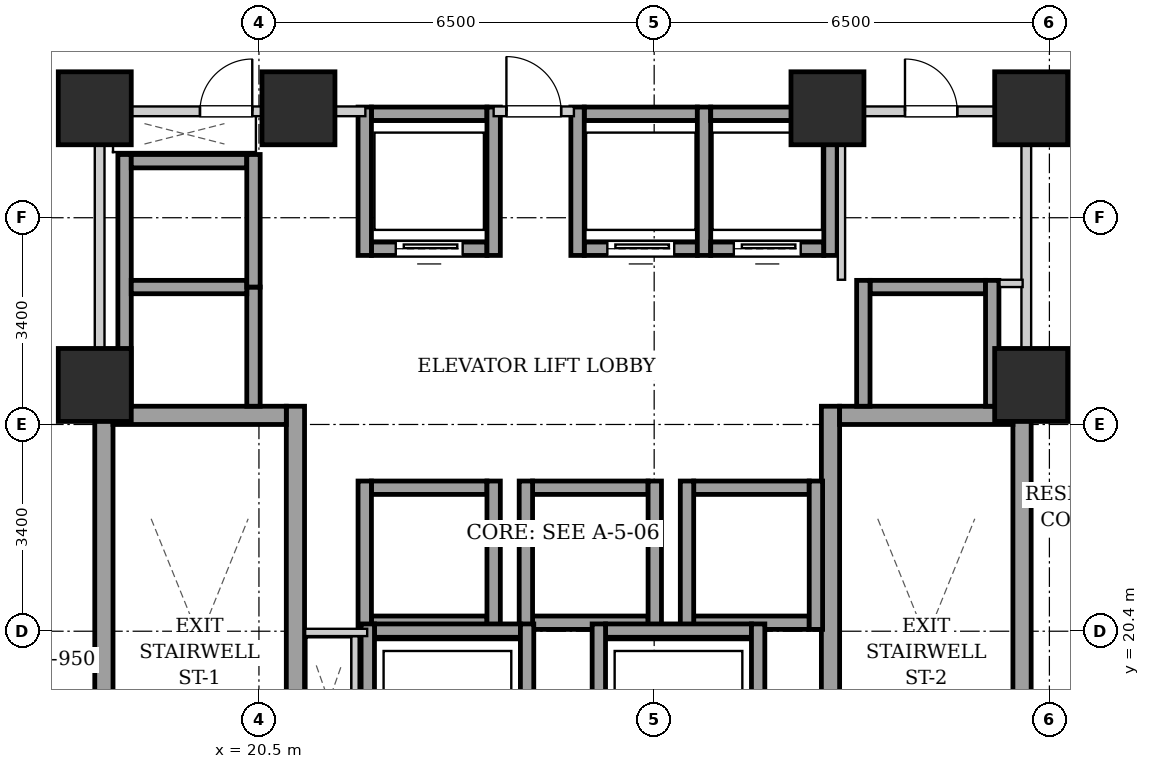
"""IFC4 building model, lengths in metres.
Left out: names, types, materials, properties, quantities, classifications, styles, units other than length and angle.
Written with IfcOpenShell. Run it as: python <this file> out.ifc"""

import sys

from ifc_helpers import new_model, si_unit, direction, frame, frame_2d, origin, origin_2d, place, context, subcontext, project, spatial, rectangle, extrude, element, fill, save


model = new_model("IFC4")
c1 = context("Model", 3, precision=1e-05, world=origin(), true_north=direction((0.0, 1.0)))
c2 = subcontext(c1, "Body", "Model", "MODEL_VIEW")
j1 = project(units=[si_unit("LENGTHUNIT", "METRE"), si_unit("PLANEANGLEUNIT", "RADIAN")], contexts=[c1])
p1 = place(None, origin())
s1 = spatial("IfcSite", under=j1, at=p1, CompositionType="ELEMENT")
p2 = place(p1, origin())
s2 = spatial("IfcBuilding", under=s1, at=p2, CompositionType="ELEMENT")
p3 = place(p2, frame((0.0, 0.0, 29.0)))
s3 = spatial("IfcBuildingStorey", under=s2, at=p3, CompositionType="ELEMENT", Elevation=29.0)
for number, where, z_axis, x_axis in (
    (1, (17.8, 29.0, 0.0), (0.0, 0.0, 1.0), (1.0, 0.0, 0.0)),
    (2, (21.15, 29.0, 0.0), (0.0, 0.0, 1.0), (1.0, 0.0, 0.0)),
    (3, (29.85, 29.0, 0.0), (0.0, 0.0, 1.0), (1.0, 0.0, 0.0)),
    (4, (33.2, 29.0, 0.0), (0.0, 0.0, 1.0), (1.0, 0.0, 0.0)),
    (5, (17.8, 24.45, 0.0), (0.0, 0.0, 1.0), (1.0, 0.0, 0.0)),
    (6, (33.2, 24.45, 0.0), (0.0, 0.0, 1.0), (1.0, 0.0, 0.0)),
):
    element("IfcColumn", number, at=place(p3, frame(where, z_axis=z_axis, x_axis=x_axis)), inside=s3, PredefinedType="COLUMN", context=c2, shape_type="SweptSolid", body=[
        extrude(rectangle(XDim=1.2, YDim=1.2, at=origin_2d()), origin(), (0.0, 0.0, 1.0), 3.2),
    ])
for number, where, z_axis, x_axis in (
    (7, (17.95, 15.1, 0.0), (0.0, 0.0, 1.0), (0.0, 1.0, 0.0)),
    (8, (21.1, 15.1, 0.0), (0.0, 0.0, 1.0), (0.0, 1.0, 0.0)),
):
    element("IfcWall", number, at=place(p3, frame(where, z_axis=z_axis, x_axis=x_axis)), inside=s3, PredefinedType="SHEAR", context=c2, shape_type="SweptSolid", body=[
        extrude(rectangle(XDim=9.0, YDim=0.3, at=frame_2d((4.5, 0.0))), origin(), (0.0, 0.0, 1.0), 2.94),
    ])
p4 = place(p3, frame((18.1, 23.95, 0.0), z_axis=(0.0, 0.0, 1.0), x_axis=(1.0, 0.0, 0.0)))
e9 = element("IfcWall", 9, at=p4, inside=s3, PredefinedType="SHEAR", context=c2, shape_type="SweptSolid", body=[
    extrude(rectangle(XDim=2.85, YDim=0.3, at=frame_2d((1.425, 0.0))), origin(), (0.0, 0.0, 1.0), 2.94),
])
for number, where, z_axis, x_axis in (
    (10, (29.9, 15.1, 0.0), (0.0, 0.0, 1.0), (0.0, 1.0, 0.0)),
    (11, (33.05, 15.1, 0.0), (0.0, 0.0, 1.0), (0.0, 1.0, 0.0)),
):
    element("IfcWall", number, at=place(p3, frame(where, z_axis=z_axis, x_axis=x_axis)), inside=s3, PredefinedType="SHEAR", context=c2, shape_type="SweptSolid", body=[
        extrude(rectangle(XDim=9.0, YDim=0.3, at=frame_2d((4.5, 0.0))), origin(), (0.0, 0.0, 1.0), 2.94),
    ])
p5 = place(p3, frame((30.05, 23.95, 0.0), z_axis=(0.0, 0.0, 1.0), x_axis=(1.0, 0.0, 0.0)))
e12 = element("IfcWall", 12, at=p5, inside=s3, PredefinedType="SHEAR", context=c2, shape_type="SweptSolid", body=[
    extrude(rectangle(XDim=2.85, YDim=0.3, at=frame_2d((1.425, 0.0))), origin(), (0.0, 0.0, 1.0), 2.94),
])
p6 = place(p3, frame((22.35, 26.69, 0.0), z_axis=(0.0, 0.0, 1.0), x_axis=(1.0, 0.0, 0.0)))
e13 = element("IfcWall", 13, at=p6, inside=s3, PredefinedType="SHEAR", context=c2, shape_type="SweptSolid", body=[
    extrude(rectangle(XDim=1.9, YDim=0.22, at=frame_2d((0.95, 0.0))), origin(), (0.0, 0.0, 1.0), 2.94),
])
p7 = place(p6, frame((0.4, 0.0, 0.0)))
e14 = element("IfcOpeningElement", 14, at=p7, cuts=e13, PredefinedType="OPENING", context=c2, shape_type="SweptSolid", body=[
    extrude(rectangle(XDim=1.1, YDim=2.15, at=frame_2d((0.55, 1.075))), frame((0.0, 0.12, 0.0), z_axis=(0.0, -1.0, 0.0), x_axis=(1.0, 0.0, 0.0)), (0.0, 0.0, 1.0), 0.24),
])
p8 = place(p3, frame((22.35, 28.91, 0.0), z_axis=(0.0, 0.0, 1.0), x_axis=(1.0, 0.0, 0.0)))
e15 = element("IfcWall", 15, at=p8, inside=s3, PredefinedType="SHEAR", context=c2, shape_type="SweptSolid", body=[
    extrude(rectangle(XDim=1.9, YDim=0.22, at=frame_2d((0.95, 0.0))), origin(), (0.0, 0.0, 1.0), 2.94),
])
for number, where, z_axis, x_axis in (
    (16, (22.24, 26.58, 0.0), (0.0, 0.0, 1.0), (0.0, 1.0, 0.0)),
    (17, (24.36, 26.58, 0.0), (0.0, 0.0, 1.0), (0.0, 1.0, 0.0)),
):
    element("IfcWall", number, at=place(p3, frame(where, z_axis=z_axis, x_axis=x_axis)), inside=s3, PredefinedType="SHEAR", context=c2, shape_type="SweptSolid", body=[
        extrude(rectangle(XDim=2.44, YDim=0.22, at=frame_2d((1.22, 0.0))), origin(), (0.0, 0.0, 1.0), 2.94),
    ])
p9 = place(p3, frame((25.85, 26.69, 0.0), z_axis=(0.0, 0.0, 1.0), x_axis=(1.0, 0.0, 0.0)))
e18 = element("IfcWall", 18, at=p9, inside=s3, PredefinedType="SHEAR", context=c2, shape_type="SweptSolid", body=[
    extrude(rectangle(XDim=1.86, YDim=0.22, at=frame_2d((0.93, 0.0))), origin(), (0.0, 0.0, 1.0), 2.94),
])
p10 = place(p9, frame((0.38, 0.0, 0.0)))
e19 = element("IfcOpeningElement", 19, at=p10, cuts=e18, PredefinedType="OPENING", context=c2, shape_type="SweptSolid", body=[
    extrude(rectangle(XDim=1.1, YDim=2.15, at=frame_2d((0.55, 1.075))), frame((0.0, 0.12, 0.0), z_axis=(0.0, -1.0, 0.0), x_axis=(1.0, 0.0, 0.0)), (0.0, 0.0, 1.0), 0.24),
])
p11 = place(p3, frame((25.85, 28.91, 0.0), z_axis=(0.0, 0.0, 1.0), x_axis=(1.0, 0.0, 0.0)))
e20 = element("IfcWall", 20, at=p11, inside=s3, PredefinedType="SHEAR", context=c2, shape_type="SweptSolid", body=[
    extrude(rectangle(XDim=1.86, YDim=0.22, at=frame_2d((0.93, 0.0))), origin(), (0.0, 0.0, 1.0), 2.94),
])
for number, where, z_axis, x_axis in (
    (21, (25.74, 26.58, 0.0), (0.0, 0.0, 1.0), (0.0, 1.0, 0.0)),
    (22, (27.82, 26.58, 0.0), (0.0, 0.0, 1.0), (0.0, 1.0, 0.0)),
):
    element("IfcWall", number, at=place(p3, frame(where, z_axis=z_axis, x_axis=x_axis)), inside=s3, PredefinedType="SHEAR", context=c2, shape_type="SweptSolid", body=[
        extrude(rectangle(XDim=2.44, YDim=0.22, at=frame_2d((1.22, 0.0))), origin(), (0.0, 0.0, 1.0), 2.94),
    ])
p12 = place(p3, frame((27.93, 26.69, 0.0), z_axis=(0.0, 0.0, 1.0), x_axis=(1.0, 0.0, 0.0)))
e23 = element("IfcWall", 23, at=p12, inside=s3, PredefinedType="SHEAR", context=c2, shape_type="SweptSolid", body=[
    extrude(rectangle(XDim=1.86, YDim=0.22, at=frame_2d((0.93, 0.0))), origin(), (0.0, 0.0, 1.0), 2.94),
])
p13 = place(p12, frame((0.38, 0.0, 0.0)))
e24 = element("IfcOpeningElement", 24, at=p13, cuts=e23, PredefinedType="OPENING", context=c2, shape_type="SweptSolid", body=[
    extrude(rectangle(XDim=1.1, YDim=2.15, at=frame_2d((0.55, 1.075))), frame((0.0, 0.12, 0.0), z_axis=(0.0, -1.0, 0.0), x_axis=(1.0, 0.0, 0.0)), (0.0, 0.0, 1.0), 0.24),
])
p14 = place(p3, frame((27.93, 28.91, 0.0), z_axis=(0.0, 0.0, 1.0), x_axis=(1.0, 0.0, 0.0)))
e25 = element("IfcWall", 25, at=p14, inside=s3, PredefinedType="SHEAR", context=c2, shape_type="SweptSolid", body=[
    extrude(rectangle(XDim=1.86, YDim=0.22, at=frame_2d((0.93, 0.0))), origin(), (0.0, 0.0, 1.0), 2.94),
])
p15 = place(p3, frame((29.9, 26.58, 0.0), z_axis=(0.0, 0.0, 1.0), x_axis=(0.0, 1.0, 0.0)))
e26 = element("IfcWall", 26, at=p15, inside=s3, PredefinedType="SHEAR", context=c2, shape_type="SweptSolid", body=[
    extrude(rectangle(XDim=2.44, YDim=0.22, at=frame_2d((1.22, 0.0))), origin(), (0.0, 0.0, 1.0), 2.94),
])
for number, where, z_axis, x_axis in (
    (27, (22.35, 20.54, 0.0), (0.0, 0.0, 1.0), (1.0, 0.0, 0.0)),
    (28, (22.35, 22.76, 0.0), (0.0, 0.0, 1.0), (1.0, 0.0, 0.0)),
):
    element("IfcWall", number, at=place(p3, frame(where, z_axis=z_axis, x_axis=x_axis)), inside=s3, PredefinedType="SHEAR", context=c2, shape_type="SweptSolid", body=[
        extrude(rectangle(XDim=1.9, YDim=0.22, at=frame_2d((0.95, 0.0))), origin(), (0.0, 0.0, 1.0), 2.94),
    ])
for number, where, z_axis, x_axis in (
    (29, (22.24, 20.43, 0.0), (0.0, 0.0, 1.0), (0.0, 1.0, 0.0)),
    (30, (24.36, 20.43, 0.0), (0.0, 0.0, 1.0), (0.0, 1.0, 0.0)),
):
    element("IfcWall", number, at=place(p3, frame(where, z_axis=z_axis, x_axis=x_axis)), inside=s3, PredefinedType="SHEAR", context=c2, shape_type="SweptSolid", body=[
        extrude(rectangle(XDim=2.44, YDim=0.22, at=frame_2d((1.22, 0.0))), origin(), (0.0, 0.0, 1.0), 2.94),
    ])
for number, where, z_axis, x_axis in (
    (31, (25.0, 20.54, 0.0), (0.0, 0.0, 1.0), (1.0, 0.0, 0.0)),
    (32, (25.0, 22.76, 0.0), (0.0, 0.0, 1.0), (1.0, 0.0, 0.0)),
):
    element("IfcWall", number, at=place(p3, frame(where, z_axis=z_axis, x_axis=x_axis)), inside=s3, PredefinedType="SHEAR", context=c2, shape_type="SweptSolid", body=[
        extrude(rectangle(XDim=1.9, YDim=0.22, at=frame_2d((0.95, 0.0))), origin(), (0.0, 0.0, 1.0), 2.94),
    ])
for number, where, z_axis, x_axis in (
    (33, (24.89, 20.43, 0.0), (0.0, 0.0, 1.0), (0.0, 1.0, 0.0)),
    (34, (27.01, 20.43, 0.0), (0.0, 0.0, 1.0), (0.0, 1.0, 0.0)),
):
    element("IfcWall", number, at=place(p3, frame(where, z_axis=z_axis, x_axis=x_axis)), inside=s3, PredefinedType="SHEAR", context=c2, shape_type="SweptSolid", body=[
        extrude(rectangle(XDim=2.44, YDim=0.22, at=frame_2d((1.22, 0.0))), origin(), (0.0, 0.0, 1.0), 2.94),
    ])
for number, where, z_axis, x_axis in (
    (35, (27.65, 20.54, 0.0), (0.0, 0.0, 1.0), (1.0, 0.0, 0.0)),
    (36, (27.65, 22.76, 0.0), (0.0, 0.0, 1.0), (1.0, 0.0, 0.0)),
):
    element("IfcWall", number, at=place(p3, frame(where, z_axis=z_axis, x_axis=x_axis)), inside=s3, PredefinedType="SHEAR", context=c2, shape_type="SweptSolid", body=[
        extrude(rectangle(XDim=1.9, YDim=0.22, at=frame_2d((0.95, 0.0))), origin(), (0.0, 0.0, 1.0), 2.94),
    ])
for number, where, z_axis, x_axis in (
    (37, (27.54, 20.43, 0.0), (0.0, 0.0, 1.0), (0.0, 1.0, 0.0)),
    (38, (29.66, 20.43, 0.0), (0.0, 0.0, 1.0), (0.0, 1.0, 0.0)),
):
    element("IfcWall", number, at=place(p3, frame(where, z_axis=z_axis, x_axis=x_axis)), inside=s3, PredefinedType="SHEAR", context=c2, shape_type="SweptSolid", body=[
        extrude(rectangle(XDim=2.44, YDim=0.22, at=frame_2d((1.22, 0.0))), origin(), (0.0, 0.0, 1.0), 2.94),
    ])
p16 = place(p3, frame((18.29, 24.1, 0.0), z_axis=(0.0, 0.0, 1.0), x_axis=(0.0, 1.0, 0.0)))
e39 = element("IfcWall", 39, at=p16, inside=s3, PredefinedType="SHEAR", context=c2, shape_type="SweptSolid", body=[
    extrude(rectangle(XDim=4.14, YDim=0.22, at=frame_2d((2.07, 0.0))), origin(), (0.0, 0.0, 1.0), 2.94),
])
p17 = place(p3, frame((20.41, 24.1, 0.0), z_axis=(0.0, 0.0, 1.0), x_axis=(0.0, 1.0, 0.0)))
e40 = element("IfcWall", 40, at=p17, inside=s3, PredefinedType="SHEAR", context=c2, shape_type="SweptSolid", body=[
    extrude(rectangle(XDim=1.96, YDim=0.22, at=frame_2d((0.98, 0.0))), origin(), (0.0, 0.0, 1.0), 2.94),
])
for number, where, z_axis, x_axis in (
    (41, (18.4, 26.06, 0.0), (0.0, 0.0, 1.0), (1.0, 0.0, 0.0)),
    (42, (18.4, 28.13, 0.0), (0.0, 0.0, 1.0), (1.0, 0.0, 0.0)),
):
    element("IfcWall", number, at=place(p3, frame(where, z_axis=z_axis, x_axis=x_axis)), inside=s3, PredefinedType="SHEAR", context=c2, shape_type="SweptSolid", body=[
        extrude(rectangle(XDim=1.9, YDim=0.22, at=frame_2d((0.95, 0.0))), origin(), (0.0, 0.0, 1.0), 2.94),
    ])
p18 = place(p3, frame((20.41, 26.06, 0.0), z_axis=(0.0, 0.0, 1.0), x_axis=(0.0, 1.0, 0.0)))
e43 = element("IfcWall", 43, at=p18, inside=s3, PredefinedType="SHEAR", context=c2, shape_type="SweptSolid", body=[
    extrude(rectangle(XDim=2.18, YDim=0.22, at=frame_2d((1.09, 0.0))), origin(), (0.0, 0.0, 1.0), 2.94),
])
p19 = place(p3, frame((30.55, 26.06, 0.0), z_axis=(0.0, 0.0, 1.0), x_axis=(1.0, 0.0, 0.0)))
e44 = element("IfcWall", 44, at=p19, inside=s3, PredefinedType="SHEAR", context=c2, shape_type="SweptSolid", body=[
    extrude(rectangle(XDim=1.9, YDim=0.22, at=frame_2d((0.95, 0.0))), origin(), (0.0, 0.0, 1.0), 2.94),
])
for number, where, z_axis, x_axis in (
    (45, (30.44, 24.1, 0.0), (0.0, 0.0, 1.0), (0.0, 1.0, 0.0)),
    (46, (32.56, 24.1, 0.0), (0.0, 0.0, 1.0), (0.0, 1.0, 0.0)),
):
    element("IfcWall", number, at=place(p3, frame(where, z_axis=z_axis, x_axis=x_axis)), inside=s3, PredefinedType="SHEAR", context=c2, shape_type="SweptSolid", body=[
        extrude(rectangle(XDim=2.07, YDim=0.22, at=frame_2d((1.035, 0.0))), origin(), (0.0, 0.0, 1.0), 2.94),
    ])
p20 = place(p3, frame((22.4, 20.41, 0.0), z_axis=(0.0, 0.0, 1.0), x_axis=(1.0, 0.0, 0.0)))
e47 = element("IfcWall", 47, at=p20, inside=s3, PredefinedType="SHEAR", context=c2, shape_type="SweptSolid", body=[
    extrude(rectangle(XDim=2.4, YDim=0.22, at=frame_2d((1.2, 0.0))), origin(), (0.0, 0.0, 1.0), 2.94),
])
for number, where, z_axis, x_axis in (
    (48, (22.29, 17.98, 0.0), (0.0, 0.0, 1.0), (0.0, 1.0, 0.0)),
    (49, (24.91, 17.98, 0.0), (0.0, 0.0, 1.0), (0.0, 1.0, 0.0)),
):
    element("IfcWall", number, at=place(p3, frame(where, z_axis=z_axis, x_axis=x_axis)), inside=s3, PredefinedType="SHEAR", context=c2, shape_type="SweptSolid", body=[
        extrude(rectangle(XDim=2.54, YDim=0.22, at=frame_2d((1.27, 0.0))), origin(), (0.0, 0.0, 1.0), 2.94),
    ])
p21 = place(p3, frame((26.2, 20.41, 0.0), z_axis=(0.0, 0.0, 1.0), x_axis=(1.0, 0.0, 0.0)))
e50 = element("IfcWall", 50, at=p21, inside=s3, PredefinedType="SHEAR", context=c2, shape_type="SweptSolid", body=[
    extrude(rectangle(XDim=2.4, YDim=0.22, at=frame_2d((1.2, 0.0))), origin(), (0.0, 0.0, 1.0), 2.94),
])
for number, where, z_axis, x_axis in (
    (51, (26.09, 17.98, 0.0), (0.0, 0.0, 1.0), (0.0, 1.0, 0.0)),
    (52, (28.71, 17.98, 0.0), (0.0, 0.0, 1.0), (0.0, 1.0, 0.0)),
):
    element("IfcWall", number, at=place(p3, frame(where, z_axis=z_axis, x_axis=x_axis)), inside=s3, PredefinedType="SHEAR", context=c2, shape_type="SweptSolid", body=[
        extrude(rectangle(XDim=2.54, YDim=0.22, at=frame_2d((1.27, 0.0))), origin(), (0.0, 0.0, 1.0), 2.94),
    ])
for number, where, z_axis, x_axis in (
    (53, (17.88, 24.12, 0.0), (0.0, 0.0, 1.0), (0.0, 1.0, 0.0)),
    (54, (33.12, 24.12, 0.0), (0.0, 0.0, 1.0), (0.0, 1.0, 0.0)),
):
    element("IfcWall", number, at=place(p3, frame(where, z_axis=z_axis, x_axis=x_axis)), inside=s3, PredefinedType="PARTITIONING", context=c2, shape_type="SweptSolid", body=[
        extrude(rectangle(XDim=4.76, YDim=0.16, at=frame_2d((2.38, 0.0))), origin(), (0.0, 0.0, 1.0), 2.275),
    ])
p22 = place(p3, frame((24.36, 28.95, 0.0), z_axis=(0.0, 0.0, 1.0), x_axis=(1.0, 0.0, 0.0)))
e55 = element("IfcWall", 55, at=p22, inside=s3, PredefinedType="PARTITIONING", context=c2, shape_type="SweptSolid", body=[
    extrude(rectangle(XDim=1.32, YDim=0.16, at=frame_2d((0.66, 0.0))), origin(), (0.0, 0.0, 1.0), 2.155),
])
p23 = place(p22, frame((0.21, 0.0, 0.0)))
e56 = element("IfcOpeningElement", 56, at=p23, cuts=e55, PredefinedType="OPENING", context=c2, shape_type="SweptSolid", body=[
    extrude(rectangle(XDim=0.9, YDim=2.05, at=frame_2d((0.45, 1.025))), frame((0.0, 0.09, 0.0), z_axis=(0.0, -1.0, 0.0), x_axis=(1.0, 0.0, 0.0)), (0.0, 0.0, 1.0), 0.18),
])
p24 = place(p3, frame((17.96, 28.95, 0.0), z_axis=(0.0, 0.0, 1.0), x_axis=(1.0, 0.0, 0.0)))
e57 = element("IfcWall", 57, at=p24, inside=s3, PredefinedType="PARTITIONING", context=c2, shape_type="SweptSolid", body=[
    extrude(rectangle(XDim=4.29, YDim=0.16, at=frame_2d((2.145, 0.0))), origin(), (0.0, 0.0, 1.0), 2.155),
])
p25 = place(p24, frame((1.57, 0.0, 0.0)))
e58 = element("IfcOpeningElement", 58, at=p25, cuts=e57, PredefinedType="OPENING", context=c2, shape_type="SweptSolid", body=[
    extrude(rectangle(XDim=0.86, YDim=2.05, at=frame_2d((0.43, 1.025))), frame((0.0, 0.09, 0.0), z_axis=(0.0, -1.0, 0.0), x_axis=(1.0, 0.0, 0.0)), (0.0, 0.0, 1.0), 0.18),
])
p26 = place(p3, frame((22.08, 18.2, 0.0), z_axis=(0.0, 0.0, 1.0), x_axis=(0.0, 1.0, 0.0)))
e59 = element("IfcWall", 59, at=p26, inside=s3, PredefinedType="PARTITIONING", context=c2, shape_type="SweptSolid", body=[
    extrude(rectangle(XDim=2.12, YDim=0.12, at=frame_2d((1.06, 0.0))), origin(), (0.0, 0.0, 1.0), 2.94),
])
p27 = place(p3, frame((22.28, 20.38, 0.0), z_axis=(0.0, 0.0, 1.0), x_axis=(-1.0, 0.0, 0.0)))
e60 = element("IfcWall", 60, at=p27, inside=s3, PredefinedType="PARTITIONING", context=c2, shape_type="SweptSolid", body=[
    extrude(rectangle(XDim=1.02, YDim=0.12, at=frame_2d((0.51, 0.0))), origin(), (0.0, 0.0, 1.0), 2.94),
])
p28 = place(p3, frame((30.08, 26.18, 0.0), z_axis=(0.0, 0.0, 1.0), x_axis=(0.0, 1.0, 0.0)))
e61 = element("IfcWall", 61, at=p28, inside=s3, PredefinedType="PARTITIONING", context=c2, shape_type="SweptSolid", body=[
    extrude(rectangle(XDim=2.68, YDim=0.12, at=frame_2d((1.34, 0.0))), origin(), (0.0, 0.0, 1.0), 2.94),
])
p29 = place(p3, frame((32.68, 26.12, 0.0), z_axis=(0.0, 0.0, 1.0), x_axis=(1.0, 0.0, 0.0)))
e62 = element("IfcWall", 62, at=p29, inside=s3, PredefinedType="PARTITIONING", context=c2, shape_type="SweptSolid", body=[
    extrude(rectangle(XDim=0.38, YDim=0.12, at=frame_2d((0.19, 0.0))), origin(), (0.0, 0.0, 1.0), 2.94),
])
p30 = place(p3, frame((30.08, 28.95, 0.0), z_axis=(0.0, 0.0, 1.0), x_axis=(1.0, 0.0, 0.0)))
e63 = element("IfcWall", 63, at=p30, inside=s3, PredefinedType="PARTITIONING", context=c2, shape_type="SweptSolid", body=[
    extrude(rectangle(XDim=2.96, YDim=0.16, at=frame_2d((1.48, 0.0))), origin(), (0.0, 0.0, 1.0), 2.94),
])
p31 = place(p30, frame((1.045, 0.0, 0.0)))
e64 = element("IfcOpeningElement", 64, at=p31, cuts=e63, PredefinedType="OPENING", context=c2, shape_type="SweptSolid", body=[
    extrude(rectangle(XDim=0.86, YDim=2.05, at=frame_2d((0.43, 1.025))), frame((0.0, 0.09, 0.0), z_axis=(0.0, -1.0, 0.0), x_axis=(1.0, 0.0, 0.0)), (0.0, 0.0, 1.0), 0.18),
])
p32 = place(p7, origin())
e65 = element("IfcDoor", 65, at=p32, inside=s3, OperationType="SLIDING_TO_LEFT", PredefinedType="DOOR", context=c2, shape_type="SweptSolid", body=[
    extrude(rectangle(XDim=1.1, YDim=2.15, at=frame_2d((0.55, 1.075))), frame((0.0, 0.025, 0.0), z_axis=(0.0, -1.0, 0.0), x_axis=(1.0, 0.0, 0.0)), (0.0, 0.0, 1.0), 0.05),
])
fill(e14, e65)
p33 = place(p10, origin())
e66 = element("IfcDoor", 66, at=p33, inside=s3, OperationType="SLIDING_TO_LEFT", PredefinedType="DOOR", context=c2, shape_type="SweptSolid", body=[
    extrude(rectangle(XDim=1.1, YDim=2.15, at=frame_2d((0.55, 1.075))), frame((0.0, 0.025, 0.0), z_axis=(0.0, -1.0, 0.0), x_axis=(1.0, 0.0, 0.0)), (0.0, 0.0, 1.0), 0.05),
])
fill(e19, e66)
p34 = place(p13, origin())
e67 = element("IfcDoor", 67, at=p34, inside=s3, OperationType="SLIDING_TO_LEFT", PredefinedType="DOOR", context=c2, shape_type="SweptSolid", body=[
    extrude(rectangle(XDim=1.1, YDim=2.15, at=frame_2d((0.55, 1.075))), frame((0.0, 0.025, 0.0), z_axis=(0.0, -1.0, 0.0), x_axis=(1.0, 0.0, 0.0)), (0.0, 0.0, 1.0), 0.05),
])
fill(e24, e67)
p35 = place(p23, origin())
e68 = element("IfcDoor", 68, at=p35, inside=s3, OperationType="SINGLE_SWING_LEFT", PredefinedType="DOOR", context=c2, shape_type="SweptSolid", body=[
    extrude(rectangle(XDim=0.9, YDim=2.05, at=frame_2d((0.45, 1.025))), frame((0.0, 0.025, 0.0), z_axis=(0.0, -1.0, 0.0), x_axis=(1.0, 0.0, 0.0)), (0.0, 0.0, 1.0), 0.05),
])
fill(e56, e68)
p36 = place(p25, origin())
e69 = element("IfcDoor", 69, at=p36, inside=s3, OperationType="SINGLE_SWING_RIGHT", PredefinedType="DOOR", context=c2, shape_type="SweptSolid", body=[
    extrude(rectangle(XDim=0.86, YDim=2.05, at=frame_2d((0.43, 1.025))), frame((0.0, 0.025, 0.0), z_axis=(0.0, -1.0, 0.0), x_axis=(1.0, 0.0, 0.0)), (0.0, 0.0, 1.0), 0.05),
])
fill(e58, e69)
p37 = place(p31, origin())
e70 = element("IfcDoor", 70, at=p37, inside=s3, OperationType="SINGLE_SWING_LEFT", PredefinedType="DOOR", context=c2, shape_type="SweptSolid", body=[
    extrude(rectangle(XDim=0.86, YDim=2.05, at=frame_2d((0.43, 1.025))), frame((0.0, 0.025, 0.0), z_axis=(0.0, -1.0, 0.0), x_axis=(1.0, 0.0, 0.0)), (0.0, 0.0, 1.0), 0.05),
])
fill(e64, e70)
save(model, sys.argv[1])
